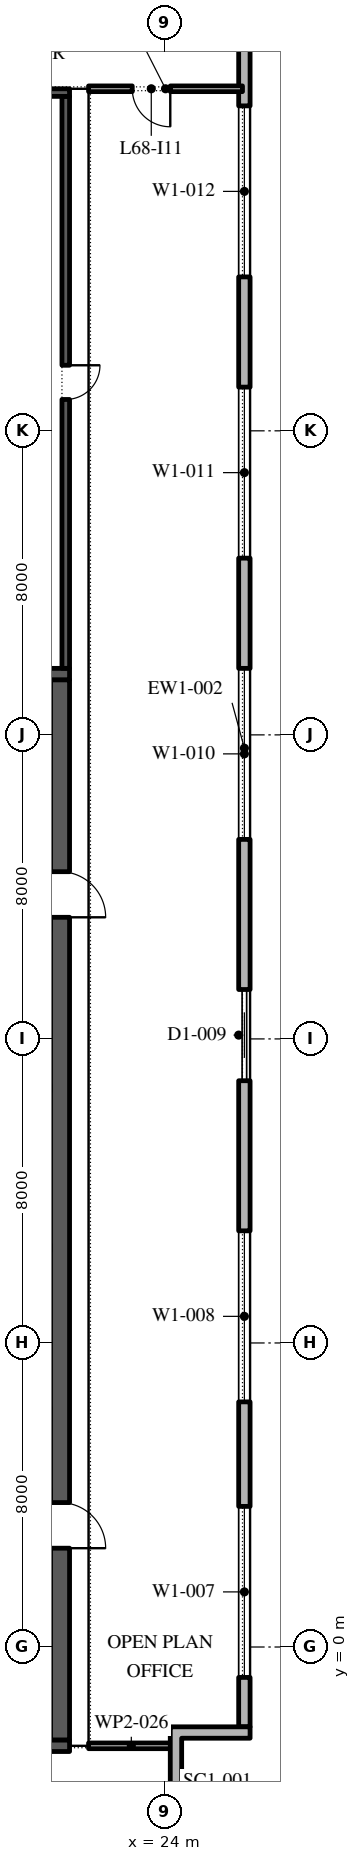
"""IFC4 building model, lengths in metres.
Left out: names, types, materials, properties, quantities, classifications, styles, units other than length and angle.
Written with IfcOpenShell. Run it as: python <this file> out.ifc"""

import sys

from ifc_helpers import new_model, si_unit, direction, frame, frame_2d, origin, place, context, subcontext, project, spatial, polyline, rectangle, outline, extrude, element, fill, save


model = new_model("IFC4")
c1 = context("Model", 3, precision=1e-05, world=origin(), true_north=direction((0.0, 1.0)))
c2 = subcontext(c1, "Body", "Model", "MODEL_VIEW")
j1 = project(units=[si_unit("LENGTHUNIT", "METRE"), si_unit("PLANEANGLEUNIT", "RADIAN")], contexts=[c1])
p1 = place(None, origin())
s1 = spatial("IfcSite", under=j1, at=p1, CompositionType="ELEMENT")
p2 = place(p1, origin())
s2 = spatial("IfcBuilding", under=s1, at=p2, CompositionType="ELEMENT")
p3 = place(p2, frame((0.0, 0.0, 313.2)))
s3 = spatial("IfcBuildingStorey", under=s2, at=p3, CompositionType="ELEMENT", Elevation=313.2)
p4 = place(p3, frame((26.1, -2.1, 0.0), z_axis=(0.0, 0.0, 1.0), x_axis=(0.0, 1.0, 0.0)))
e1 = element("IfcWall", 1, at=p4, inside=s3, PredefinedType="STANDARD", context=c2, shape_type="SweptSolid", body=[
    extrude(rectangle(XDim=51.5, YDim=0.3, at=frame_2d((25.75, 0.0))), origin(), (0.0, 0.0, 1.0), 4.0),
])
p5 = place(p4, frame((1.3, 0.0, 0.45)))
e2 = element("IfcOpeningElement", 2, at=p5, cuts=e1, PredefinedType="OPENING", context=c2, shape_type="SweptSolid", body=[
    extrude(rectangle(XDim=4.5, YDim=3.05, at=frame_2d((2.25, 1.525))), frame((0.0, 0.16, 0.0), z_axis=(0.0, -1.0, 0.0), x_axis=(1.0, 0.0, 0.0)), (0.0, 0.0, 1.0), 0.32),
])
p6 = place(p4, frame((8.55, 0.0, 0.45)))
e3 = element("IfcOpeningElement", 3, at=p6, cuts=e1, PredefinedType="OPENING", context=c2, shape_type="SweptSolid", body=[
    extrude(rectangle(XDim=4.5, YDim=3.05, at=frame_2d((2.25, 1.525))), frame((0.0, 0.16, 0.0), z_axis=(0.0, -1.0, 0.0), x_axis=(1.0, 0.0, 0.0)), (0.0, 0.0, 1.0), 0.32),
])
p7 = place(p4, frame((17.0, 0.0, 0.0)))
e4 = element("IfcOpeningElement", 4, at=p7, cuts=e1, PredefinedType="OPENING", context=c2, shape_type="SweptSolid", body=[
    extrude(rectangle(XDim=2.4, YDim=3.5, at=frame_2d((1.2, 1.75))), frame((0.0, 0.16, 0.0), z_axis=(0.0, -1.0, 0.0), x_axis=(1.0, 0.0, 0.0)), (0.0, 0.0, 1.0), 0.32),
])
p8 = place(p4, frame((23.35, 0.0, 0.45)))
e5 = element("IfcOpeningElement", 5, at=p8, cuts=e1, PredefinedType="OPENING", context=c2, shape_type="SweptSolid", body=[
    extrude(rectangle(XDim=4.5, YDim=3.05, at=frame_2d((2.25, 1.525))), frame((0.0, 0.16, 0.0), z_axis=(0.0, -1.0, 0.0), x_axis=(1.0, 0.0, 0.0)), (0.0, 0.0, 1.0), 0.32),
])
p9 = place(p4, frame((30.75, 0.0, 0.45)))
e6 = element("IfcOpeningElement", 6, at=p9, cuts=e1, PredefinedType="OPENING", context=c2, shape_type="SweptSolid", body=[
    extrude(rectangle(XDim=4.5, YDim=3.05, at=frame_2d((2.25, 1.525))), frame((0.0, 0.16, 0.0), z_axis=(0.0, -1.0, 0.0), x_axis=(1.0, 0.0, 0.0)), (0.0, 0.0, 1.0), 0.32),
])
p10 = place(p4, frame((38.15, 0.0, 0.45)))
e7 = element("IfcOpeningElement", 7, at=p10, cuts=e1, PredefinedType="OPENING", context=c2, shape_type="SweptSolid", body=[
    extrude(rectangle(XDim=4.5, YDim=3.05, at=frame_2d((2.25, 1.525))), frame((0.0, 0.16, 0.0), z_axis=(0.0, -1.0, 0.0), x_axis=(1.0, 0.0, 0.0)), (0.0, 0.0, 1.0), 0.32),
])
p11 = place(p4, frame((46.6, 0.0, 0.0)))
e8 = element("IfcOpeningElement", 8, at=p11, cuts=e1, PredefinedType="OPENING", context=c2, shape_type="SweptSolid", body=[
    extrude(rectangle(XDim=2.4, YDim=3.5, at=frame_2d((1.2, 1.75))), frame((0.0, 0.16, 0.0), z_axis=(0.0, -1.0, 0.0), x_axis=(1.0, 0.0, 0.0)), (0.0, 0.0, 1.0), 0.32),
])
p12 = place(p3, origin())
e9 = element("IfcWall", 9, at=p12, inside=s3, PredefinedType="STANDARD", context=c2, shape_type="SweptSolid", body=[
    extrude(outline(polyline([(24.15, -3.9), (24.15, -2.1), (26.25, -2.1), (26.25, -2.4), (24.45, -2.4), (24.45, -4.2), (22.65, -4.2), (22.65, -5.7), (22.35, -5.7), (22.35, -3.9), (24.15, -3.9)])), origin(), (0.0, 0.0, 1.0), 4.0),
])
p13 = place(p3, frame((21.25, -2.45, 0.0), z_axis=(0.0, 0.0, 1.0), x_axis=(0.0, 1.0, 0.0)))
e10 = element("IfcWall", 10, at=p13, inside=s3, PredefinedType="SHEAR", context=c2, shape_type="SweptSolid", body=[
    extrude(rectangle(XDim=27.9, YDim=0.5, at=frame_2d((13.95, 0.0))), origin(), (0.0, 0.0, 1.0), 4.0),
])
p14 = place(p13, frame((5.05, 0.0, 0.0)))
e11 = element("IfcOpeningElement", 11, at=p14, cuts=e10, PredefinedType="OPENING", context=c2, shape_type="SweptSolid", body=[
    extrude(rectangle(XDim=1.2, YDim=2.1, at=frame_2d((0.6, 1.05))), frame((0.0, 0.26, 0.0), z_axis=(0.0, -1.0, 0.0), x_axis=(1.0, 0.0, 0.0)), (0.0, 0.0, 1.0), 0.52),
])
p15 = place(p13, frame((21.65, 0.0, 0.0)))
e12 = element("IfcOpeningElement", 12, at=p15, cuts=e10, PredefinedType="OPENING", context=c2, shape_type="SweptSolid", body=[
    extrude(rectangle(XDim=1.2, YDim=2.1, at=frame_2d((0.6, 1.05))), frame((0.0, 0.26, 0.0), z_axis=(0.0, -1.0, 0.0), x_axis=(1.0, 0.0, 0.0)), (0.0, 0.0, 1.0), 0.52),
])
for number, where, z_axis, x_axis in (
    (13, (10.5, -2.6, 0.0), (0.0, 0.0, 1.0), (1.0, 0.0, 0.0)),
    (14, (10.5, 25.6, 0.0), (0.0, 0.0, 1.0), (1.0, 0.0, 0.0)),
):
    element("IfcWall", number, at=place(p3, frame(where, z_axis=z_axis, x_axis=x_axis)), inside=s3, PredefinedType="SHEAR", context=c2, shape_type="SweptSolid", body=[
        extrude(rectangle(XDim=11.0, YDim=0.3, at=frame_2d((5.5, 0.0))), origin(), (0.0, 0.0, 1.0), 4.0),
    ])
p16 = place(p3, frame((21.4, 25.75, 0.0), z_axis=(0.0, 0.0, 1.0), x_axis=(0.0, 1.0, 0.0)))
e15 = element("IfcWall", 15, at=p16, inside=s3, PredefinedType="SHEAR", context=c2, shape_type="SweptSolid", body=[
    extrude(rectangle(XDim=15.05, YDim=0.2, at=frame_2d((7.525, 0.0))), origin(), (0.0, 0.0, 1.0), 4.0),
])
p17 = place(p16, frame((7.075, 0.0, 0.0)))
e16 = element("IfcOpeningElement", 16, at=p17, cuts=e15, PredefinedType="OPENING", context=c2, shape_type="SweptSolid", body=[
    extrude(rectangle(XDim=0.9, YDim=2.1, at=frame_2d((0.45, 1.05))), frame((0.0, 0.11, 0.0), z_axis=(0.0, -1.0, 0.0), x_axis=(1.0, 0.0, 0.0)), (0.0, 0.0, 1.0), 0.22),
])
p18 = place(p3, frame((10.5, 40.9, 0.0), z_axis=(0.0, 0.0, 1.0), x_axis=(1.0, 0.0, 0.0)))
e17 = element("IfcWall", 17, at=p18, inside=s3, PredefinedType="SHEAR", context=c2, shape_type="SweptSolid", body=[
    extrude(rectangle(XDim=11.0, YDim=0.2, at=frame_2d((5.5, 0.0))), origin(), (0.0, 0.0, 1.0), 4.0),
])
p19 = place(p3, frame((22.0, -2.6, 0.0), z_axis=(0.0, 0.0, 1.0), x_axis=(1.0, 0.0, 0.0)))
e18 = element("IfcWall", 18, at=p19, inside=s3, PredefinedType="PARTITIONING", context=c2, shape_type="SweptSolid", body=[
    extrude(rectangle(XDim=2.25, YDim=0.15, at=frame_2d((1.125, 0.0))), origin(), (0.0, 0.0, 1.0), 4.0),
])
p20 = place(p3, frame((26.05, 41.0, 0.0), z_axis=(0.0, 0.0, 1.0), x_axis=(-1.0, 0.0, 0.0)))
e19 = element("IfcWall", 19, at=p20, inside=s3, PredefinedType="PARTITIONING", context=c2, shape_type="SweptSolid", body=[
    extrude(rectangle(XDim=4.05, YDim=0.15, at=frame_2d((2.025, 0.0))), origin(), (0.0, 0.0, 1.0), 4.0),
])
p21 = place(p20, frame((1.9, 0.0, 0.0)))
e20 = element("IfcOpeningElement", 20, at=p21, cuts=e19, PredefinedType="OPENING", context=c2, shape_type="SweptSolid", body=[
    extrude(rectangle(XDim=1.0, YDim=2.1, at=frame_2d((0.5, 1.05))), frame((0.0, 0.085, 0.0), z_axis=(0.0, -1.0, 0.0), x_axis=(1.0, 0.0, 0.0)), (0.0, 0.0, 1.0), 0.17),
])
p22 = place(p5, origin())
e21 = element("IfcWindow", 21, at=p22, inside=s3, PartitioningType="DOUBLE_PANEL_VERTICAL", PredefinedType="WINDOW", context=c2, shape_type="SweptSolid", body=[
    extrude(rectangle(XDim=4.5, YDim=3.05, at=frame_2d((2.25, 1.525))), frame((0.0, 0.03, 0.0), z_axis=(0.0, -1.0, 0.0), x_axis=(1.0, 0.0, 0.0)), (0.0, 0.0, 1.0), 0.06),
])
fill(e2, e21)
p23 = place(p6, origin())
e22 = element("IfcWindow", 22, at=p23, inside=s3, PartitioningType="DOUBLE_PANEL_VERTICAL", PredefinedType="WINDOW", context=c2, shape_type="SweptSolid", body=[
    extrude(rectangle(XDim=4.5, YDim=3.05, at=frame_2d((2.25, 1.525))), frame((0.0, 0.03, 0.0), z_axis=(0.0, -1.0, 0.0), x_axis=(1.0, 0.0, 0.0)), (0.0, 0.0, 1.0), 0.06),
])
fill(e3, e22)
p24 = place(p7, origin())
e23 = element("IfcDoor", 23, at=p24, inside=s3, OperationType="DOUBLE_DOOR_SLIDING", PredefinedType="DOOR", context=c2, shape_type="SweptSolid", body=[
    extrude(rectangle(XDim=2.4, YDim=3.5, at=frame_2d((1.2, 1.75))), frame((0.0, 0.025, 0.0), z_axis=(0.0, -1.0, 0.0), x_axis=(1.0, 0.0, 0.0)), (0.0, 0.0, 1.0), 0.05),
])
fill(e4, e23)
p25 = place(p8, origin())
e24 = element("IfcWindow", 24, at=p25, inside=s3, PartitioningType="DOUBLE_PANEL_VERTICAL", PredefinedType="WINDOW", context=c2, shape_type="SweptSolid", body=[
    extrude(rectangle(XDim=4.5, YDim=3.05, at=frame_2d((2.25, 1.525))), frame((0.0, 0.03, 0.0), z_axis=(0.0, -1.0, 0.0), x_axis=(1.0, 0.0, 0.0)), (0.0, 0.0, 1.0), 0.06),
])
fill(e5, e24)
p26 = place(p9, origin())
e25 = element("IfcWindow", 25, at=p26, inside=s3, PartitioningType="DOUBLE_PANEL_VERTICAL", PredefinedType="WINDOW", context=c2, shape_type="SweptSolid", body=[
    extrude(rectangle(XDim=4.5, YDim=3.05, at=frame_2d((2.25, 1.525))), frame((0.0, 0.03, 0.0), z_axis=(0.0, -1.0, 0.0), x_axis=(1.0, 0.0, 0.0)), (0.0, 0.0, 1.0), 0.06),
])
fill(e6, e25)
p27 = place(p10, origin())
e26 = element("IfcWindow", 26, at=p27, inside=s3, PartitioningType="DOUBLE_PANEL_VERTICAL", PredefinedType="WINDOW", context=c2, shape_type="SweptSolid", body=[
    extrude(rectangle(XDim=4.5, YDim=3.05, at=frame_2d((2.25, 1.525))), frame((0.0, 0.03, 0.0), z_axis=(0.0, -1.0, 0.0), x_axis=(1.0, 0.0, 0.0)), (0.0, 0.0, 1.0), 0.06),
])
fill(e7, e26)
p28 = place(p14, frame((1.2, 0.0, 0.0), z_axis=(0.0, 0.0, 1.0), x_axis=(-1.0, 0.0, 0.0)))
e27 = element("IfcDoor", 27, at=p28, inside=s3, OperationType="SINGLE_SWING_LEFT", PredefinedType="DOOR", context=c2, shape_type="SweptSolid", body=[
    extrude(rectangle(XDim=1.2, YDim=2.1, at=frame_2d((0.6, 1.05))), frame((0.0, 0.025, 0.0), z_axis=(0.0, -1.0, 0.0), x_axis=(1.0, 0.0, 0.0)), (0.0, 0.0, 1.0), 0.05),
])
fill(e11, e27)
p29 = place(p15, frame((1.2, 0.0, 0.0), z_axis=(0.0, 0.0, 1.0), x_axis=(-1.0, 0.0, 0.0)))
e28 = element("IfcDoor", 28, at=p29, inside=s3, OperationType="SINGLE_SWING_LEFT", PredefinedType="DOOR", context=c2, shape_type="SweptSolid", body=[
    extrude(rectangle(XDim=1.2, YDim=2.1, at=frame_2d((0.6, 1.05))), frame((0.0, 0.025, 0.0), z_axis=(0.0, -1.0, 0.0), x_axis=(1.0, 0.0, 0.0)), (0.0, 0.0, 1.0), 0.05),
])
fill(e12, e28)
p30 = place(p17, frame((0.9, 0.15, 0.0), z_axis=(0.0, 0.0, 1.0), x_axis=(-1.0, 0.0, 0.0)))
e29 = element("IfcDoor", 29, at=p30, inside=s3, OperationType="SINGLE_SWING_RIGHT", PredefinedType="DOOR", context=c2, shape_type="SweptSolid", body=[
    extrude(rectangle(XDim=0.9, YDim=2.1, at=frame_2d((0.45, 1.05))), frame((0.0, 0.1, 0.0), z_axis=(0.0, -1.0, 0.0), x_axis=(1.0, 0.0, 0.0)), (0.0, 0.0, 1.0), 0.05),
])
fill(e16, e29)
p31 = place(p21, origin())
e30 = element("IfcDoor", 30, at=p31, inside=s3, OperationType="SINGLE_SWING_RIGHT", PredefinedType="DOOR", context=c2, shape_type="SweptSolid", body=[
    extrude(rectangle(XDim=1.0, YDim=2.1, at=frame_2d((0.5, 1.05))), frame((0.0, 0.025, 0.0), z_axis=(0.0, -1.0, 0.0), x_axis=(1.0, 0.0, 0.0)), (0.0, 0.0, 1.0), 0.05),
])
fill(e20, e30)
save(model, sys.argv[1])
